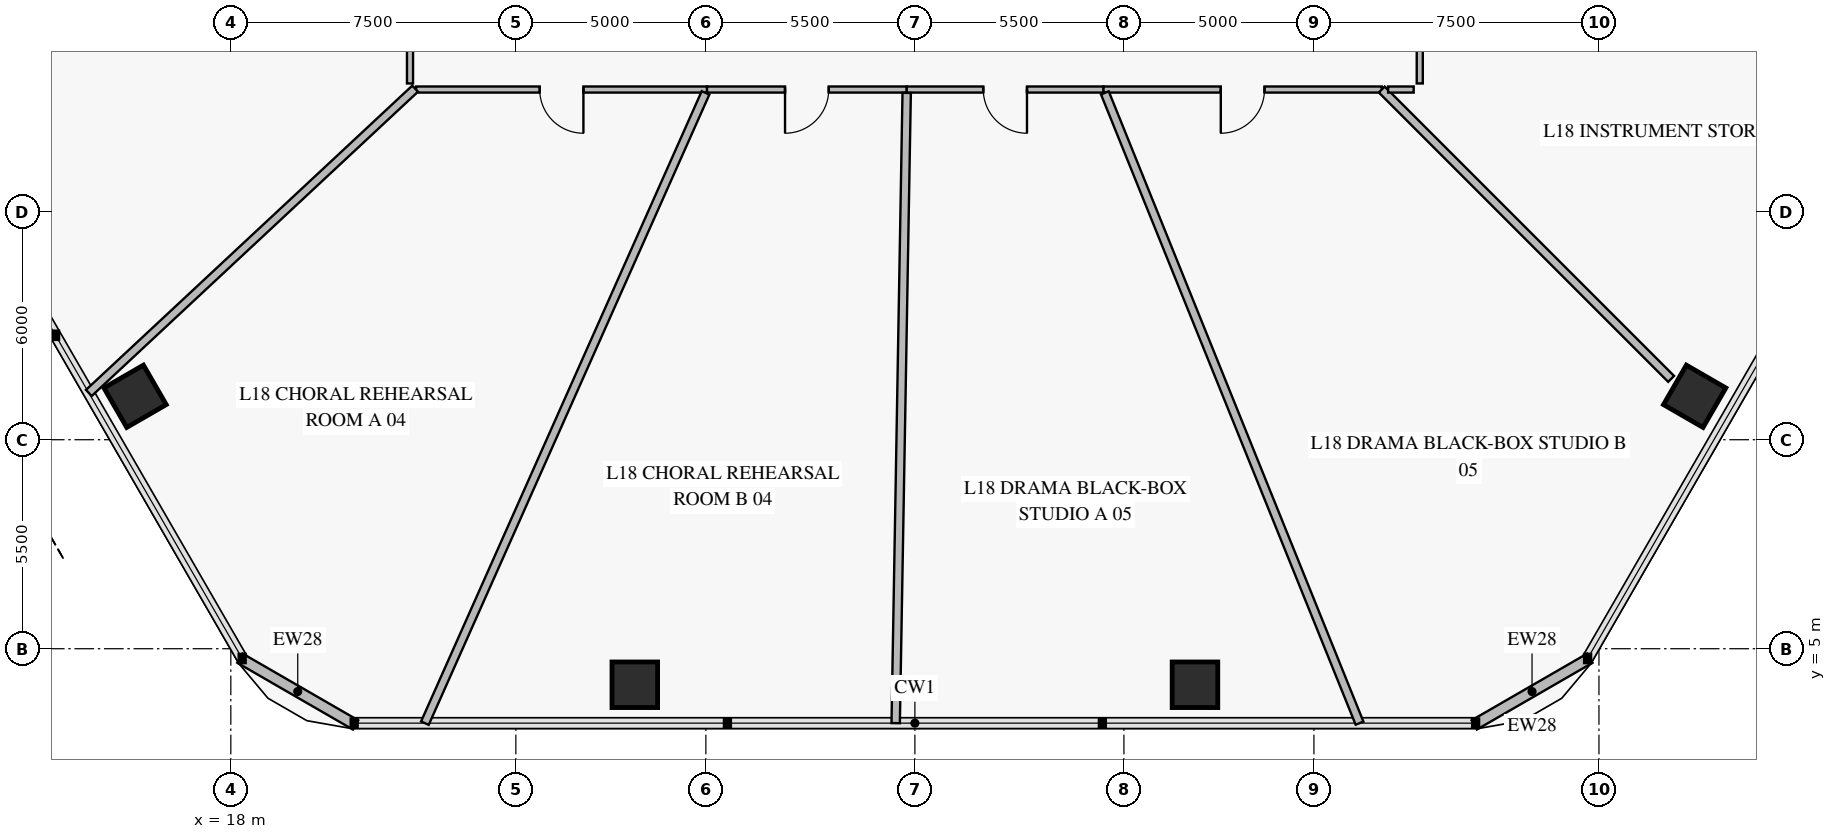
"""IFC4 building model, lengths in metres.
Left out: names, types, materials, properties, quantities, classifications, styles, units other than length and angle.
Written with IfcOpenShell. Run it as: python <this file> out.ifc"""

import sys

from ifc_helpers import new_model, si_unit, direction, frame, frame_2d, origin, origin_2d, place, context, subcontext, project, spatial, rectangle, extrude, element, fill, save


model = new_model("IFC4")
c1 = context("Model", 3, precision=1e-05, world=origin(), true_north=direction((0.0, 1.0)))
c2 = subcontext(c1, "Body", "Model", "MODEL_VIEW")
j1 = project(units=[si_unit("LENGTHUNIT", "METRE"), si_unit("PLANEANGLEUNIT", "RADIAN")], contexts=[c1])
p1 = place(None, origin())
s1 = spatial("IfcSite", under=j1, at=p1, CompositionType="ELEMENT")
p2 = place(p1, origin())
s2 = spatial("IfcBuilding", under=s1, at=p2, CompositionType="ELEMENT")
p3 = place(p2, frame((0.0, 0.0, 75.0)))
s3 = spatial("IfcBuildingStorey", under=s2, at=p3, CompositionType="ELEMENT", Elevation=75.0)
for number, where, z_axis, x_axis in (
    (1, (15.481, 11.643, 0.0), (0.0, 0.0, 1.0), (0.5, -0.866, 0.0)),
    (2, (28.63, 4.052, 0.0), (0.0, 0.0, 1.0), (1.0, 0.0, 0.0)),
    (3, (43.37, 4.052, 0.0), (0.0, 0.0, 1.0), (1.0, 0.0, 0.0)),
    (4, (56.519, 11.643, 0.0), (0.0, 0.0, 1.0), (0.5, 0.866, 0.0)),
):
    element("IfcColumn", number, at=place(p3, frame(where, z_axis=z_axis, x_axis=x_axis)), inside=s3, PredefinedType="COLUMN", context=c2, shape_type="SweptSolid", body=[
        extrude(rectangle(XDim=1.2, YDim=1.2, at=origin_2d()), origin(), (0.0, 0.0, 1.0), 3.92),
    ])
for number, where, z_axis, x_axis in (
    (5, (53.761, 4.751, 0.0), (0.0, 0.0, 1.0), (-0.866, -0.5, 0.0)),
    (6, (21.283, 2.994, 0.0), (0.0, 0.0, 1.0), (-0.866, 0.5, 0.0)),
):
    element("IfcWall", number, at=place(p3, frame(where, z_axis=z_axis, x_axis=x_axis)), inside=s3, PredefinedType="SOLIDWALL", context=c2, shape_type="SweptSolid", body=[
        extrude(rectangle(XDim=3.515, YDim=0.28, at=frame_2d((1.757, 0.0))), origin(), (0.0, 0.0, 1.0), 3.92),
    ])
p4 = place(p3, frame((22.715, 34.104, 0.0), z_axis=(0.0, 0.0, 1.0), x_axis=(0.0, -1.0, 0.0)))
e7 = element("IfcWall", 7, at=p4, inside=s3, PredefinedType="PARTITIONING", context=c2, shape_type="SweptSolid", body=[
    extrude(rectangle(XDim=14.229, YDim=0.16, at=frame_2d((7.115, 0.0))), origin(), (0.0, 0.0, 1.0), 3.22),
])
p5 = place(p4, frame((6.54, 0.0, 0.0)))
e8 = element("IfcOpeningElement", 8, at=p5, cuts=e7, PredefinedType="OPENING", context=c2, shape_type="SweptSolid", body=[
    extrude(rectangle(XDim=1.15, YDim=2.2, at=frame_2d((0.575, 1.1))), frame((0.0, 0.092, 0.0), z_axis=(0.0, -1.0, 0.0), x_axis=(1.0, 0.0, 0.0)), (0.0, 0.0, 1.0), 0.184),
])
p6 = place(p3, frame((22.875, 19.715, 0.0), z_axis=(0.0, 0.0, 1.0), x_axis=(1.0, 0.0, 0.0)))
e9 = element("IfcWall", 9, at=p6, inside=s3, PredefinedType="PARTITIONING", context=c2, shape_type="SweptSolid", body=[
    extrude(rectangle(XDim=7.656, YDim=0.16, at=frame_2d((3.828, 0.0))), origin(), (0.0, 0.0, 1.0), 3.22),
])
p7 = place(p6, frame((3.253, 0.0, 0.0)))
e10 = element("IfcOpeningElement", 10, at=p7, cuts=e9, PredefinedType="OPENING", context=c2, shape_type="SweptSolid", body=[
    extrude(rectangle(XDim=1.15, YDim=2.2, at=frame_2d((0.575, 1.1))), frame((0.0, 0.092, 0.0), z_axis=(0.0, -1.0, 0.0), x_axis=(1.0, 0.0, 0.0)), (0.0, 0.0, 1.0), 0.184),
])
p8 = place(p3, frame((30.531, 19.715, 0.0), z_axis=(0.0, 0.0, 1.0), x_axis=(1.0, 0.0, 0.0)))
e11 = element("IfcWall", 11, at=p8, inside=s3, PredefinedType="PARTITIONING", context=c2, shape_type="SweptSolid", body=[
    extrude(rectangle(XDim=5.255, YDim=0.16, at=frame_2d((2.627, 0.0))), origin(), (0.0, 0.0, 1.0), 3.22),
])
p9 = place(p8, frame((2.052, 0.0, 0.0)))
e12 = element("IfcOpeningElement", 12, at=p9, cuts=e11, PredefinedType="OPENING", context=c2, shape_type="SweptSolid", body=[
    extrude(rectangle(XDim=1.15, YDim=2.2, at=frame_2d((0.575, 1.1))), frame((0.0, 0.092, 0.0), z_axis=(0.0, -1.0, 0.0), x_axis=(1.0, 0.0, 0.0)), (0.0, 0.0, 1.0), 0.184),
])
p10 = place(p3, frame((35.786, 19.715, 0.0), z_axis=(0.0, 0.0, 1.0), x_axis=(1.0, 0.0, 0.0)))
e13 = element("IfcWall", 13, at=p10, inside=s3, PredefinedType="PARTITIONING", context=c2, shape_type="SweptSolid", body=[
    extrude(rectangle(XDim=5.178, YDim=0.16, at=frame_2d((2.589, 0.0))), origin(), (0.0, 0.0, 1.0), 3.22),
])
p11 = place(p10, frame((2.014, 0.0, 0.0)))
e14 = element("IfcOpeningElement", 14, at=p11, cuts=e13, PredefinedType="OPENING", context=c2, shape_type="SweptSolid", body=[
    extrude(rectangle(XDim=1.15, YDim=2.2, at=frame_2d((0.575, 1.1))), frame((0.0, 0.092, 0.0), z_axis=(0.0, -1.0, 0.0), x_axis=(1.0, 0.0, 0.0)), (0.0, 0.0, 1.0), 0.184),
])
p12 = place(p3, frame((40.963, 19.715, 0.0), z_axis=(0.0, 0.0, 1.0), x_axis=(1.0, 0.0, 0.0)))
e15 = element("IfcWall", 15, at=p12, inside=s3, PredefinedType="PARTITIONING", context=c2, shape_type="SweptSolid", body=[
    extrude(rectangle(XDim=7.322, YDim=0.16, at=frame_2d((3.661, 0.0))), origin(), (0.0, 0.0, 1.0), 3.22),
])
p13 = place(p12, frame((3.086, 0.0, 0.0)))
e16 = element("IfcOpeningElement", 16, at=p13, cuts=e15, PredefinedType="OPENING", context=c2, shape_type="SweptSolid", body=[
    extrude(rectangle(XDim=1.15, YDim=2.2, at=frame_2d((0.575, 1.1))), frame((0.0, 0.092, 0.0), z_axis=(0.0, -1.0, 0.0), x_axis=(1.0, 0.0, 0.0)), (0.0, 0.0, 1.0), 0.184),
])
p14 = place(p3, frame((49.285, 19.875, 0.0), z_axis=(0.0, 0.0, 1.0), x_axis=(0.0, 1.0, 0.0)))
e17 = element("IfcWall", 17, at=p14, inside=s3, PredefinedType="PARTITIONING", context=c2, shape_type="SweptSolid", body=[
    extrude(rectangle(XDim=6.622, YDim=0.16, at=frame_2d((3.311, 0.0))), origin(), (0.0, 0.0, 1.0), 3.92),
])
p15 = place(p14, frame((2.836, 0.0, 0.0)))
e18 = element("IfcOpeningElement", 18, at=p15, cuts=e17, PredefinedType="OPENING", context=c2, shape_type="SweptSolid", body=[
    extrude(rectangle(XDim=0.95, YDim=2.1, at=frame_2d((0.475, 1.05))), frame((0.0, 0.092, 0.0), z_axis=(0.0, -1.0, 0.0), x_axis=(1.0, 0.0, 0.0)), (0.0, 0.0, 1.0), 0.184),
])
p16 = place(p3, frame((22.85, 19.737, 0.0), z_axis=(0.0, 0.0, 1.0), x_axis=(-0.731360864489, -0.681990678744, 0.0)))
e19 = element("IfcWall", 19, at=p16, inside=s3, PredefinedType="PARTITIONING", context=c2, shape_type="SweptSolid", body=[
    extrude(rectangle(XDim=11.74, YDim=0.22, at=frame_2d((5.87, 0.0))), origin(), (0.0, 0.0, 1.0), 3.17),
])
p17 = place(p3, frame((30.491, 19.627, 0.0), z_axis=(0.0, 0.0, 1.0), x_axis=(-0.406746008396, -0.913541287876, 0.0)))
e20 = element("IfcWall", 20, at=p17, inside=s3, PredefinedType="PARTITIONING", context=c2, shape_type="SweptSolid", body=[
    extrude(rectangle(XDim=18.155, YDim=0.22, at=frame_2d((9.078, 0.0))), origin(), (0.0, 0.0, 1.0), 3.17),
])
p18 = place(p3, frame((35.784, 19.627, 0.0), z_axis=(0.0, 0.0, 1.0), x_axis=(-0.01745546123, -0.99984764183, 0.0)))
e21 = element("IfcWall", 21, at=p18, inside=s3, PredefinedType="PARTITIONING", context=c2, shape_type="SweptSolid", body=[
    extrude(rectangle(XDim=16.588, YDim=0.22, at=frame_2d((8.294, 0.0))), origin(), (0.0, 0.0, 1.0), 3.17),
])
p19 = place(p3, frame((40.999, 19.627, 0.0), z_axis=(0.0, 0.0, 1.0), x_axis=(0.374605213306, -0.927184412166, 0.0)))
e22 = element("IfcWall", 22, at=p19, inside=s3, PredefinedType="PARTITIONING", context=c2, shape_type="SweptSolid", body=[
    extrude(rectangle(XDim=17.888, YDim=0.22, at=frame_2d((8.944, 0.0))), origin(), (0.0, 0.0, 1.0), 3.17),
])
p20 = place(p3, frame((48.285, 19.715, 0.0), z_axis=(0.0, 0.0, 1.0), x_axis=(0.707106781187, -0.707106781187, 0.0)))
e23 = element("IfcWall", 23, at=p20, inside=s3, PredefinedType="PARTITIONING", context=c2, shape_type="SweptSolid", body=[
    extrude(rectangle(XDim=10.768, YDim=0.22, at=frame_2d((5.384, 0.0))), origin(), (0.0, 0.0, 1.0), 3.22),
])
p21 = place(p3, frame((48.452, 19.715, 0.0), z_axis=(0.0, 0.0, 1.0), x_axis=(1.0, 0.0, 0.0)))
e24 = element("IfcWall", 24, at=p21, inside=s3, PredefinedType="PARTITIONING", context=c2, shape_type="SweptSolid", body=[
    extrude(rectangle(XDim=0.673, YDim=0.16, at=frame_2d((0.336, 0.0))), origin(), (0.0, 0.0, 1.0), 3.22),
])
p22 = place(p7, frame((1.15, 0.0, 0.0), z_axis=(0.0, 0.0, 1.0), x_axis=(-1.0, 0.0, 0.0)))
e25 = element("IfcDoor", 25, at=p22, inside=s3, OperationType="SINGLE_SWING_LEFT", PredefinedType="DOOR", context=c2, shape_type="SweptSolid", body=[
    extrude(rectangle(XDim=1.15, YDim=2.2, at=frame_2d((0.575, 1.1))), frame((0.0, 0.025, 0.0), z_axis=(0.0, -1.0, 0.0), x_axis=(1.0, 0.0, 0.0)), (0.0, 0.0, 1.0), 0.05),
])
fill(e10, e25)
p23 = place(p9, frame((1.15, 0.0, 0.0), z_axis=(0.0, 0.0, 1.0), x_axis=(-1.0, 0.0, 0.0)))
e26 = element("IfcDoor", 26, at=p23, inside=s3, OperationType="SINGLE_SWING_RIGHT", PredefinedType="DOOR", context=c2, shape_type="SweptSolid", body=[
    extrude(rectangle(XDim=1.15, YDim=2.2, at=frame_2d((0.575, 1.1))), frame((0.0, 0.025, 0.0), z_axis=(0.0, -1.0, 0.0), x_axis=(1.0, 0.0, 0.0)), (0.0, 0.0, 1.0), 0.05),
])
fill(e12, e26)
p24 = place(p11, frame((1.15, 0.0, 0.0), z_axis=(0.0, 0.0, 1.0), x_axis=(-1.0, 0.0, 0.0)))
e27 = element("IfcDoor", 27, at=p24, inside=s3, OperationType="SINGLE_SWING_LEFT", PredefinedType="DOOR", context=c2, shape_type="SweptSolid", body=[
    extrude(rectangle(XDim=1.15, YDim=2.2, at=frame_2d((0.575, 1.1))), frame((0.0, 0.025, 0.0), z_axis=(0.0, -1.0, 0.0), x_axis=(1.0, 0.0, 0.0)), (0.0, 0.0, 1.0), 0.05),
])
fill(e14, e27)
p25 = place(p13, frame((1.15, 0.0, 0.0), z_axis=(0.0, 0.0, 1.0), x_axis=(-1.0, 0.0, 0.0)))
e28 = element("IfcDoor", 28, at=p25, inside=s3, OperationType="SINGLE_SWING_RIGHT", PredefinedType="DOOR", context=c2, shape_type="SweptSolid", body=[
    extrude(rectangle(XDim=1.15, YDim=2.2, at=frame_2d((0.575, 1.1))), frame((0.0, 0.025, 0.0), z_axis=(0.0, -1.0, 0.0), x_axis=(1.0, 0.0, 0.0)), (0.0, 0.0, 1.0), 0.05),
])
fill(e16, e28)
save(model, sys.argv[1])
